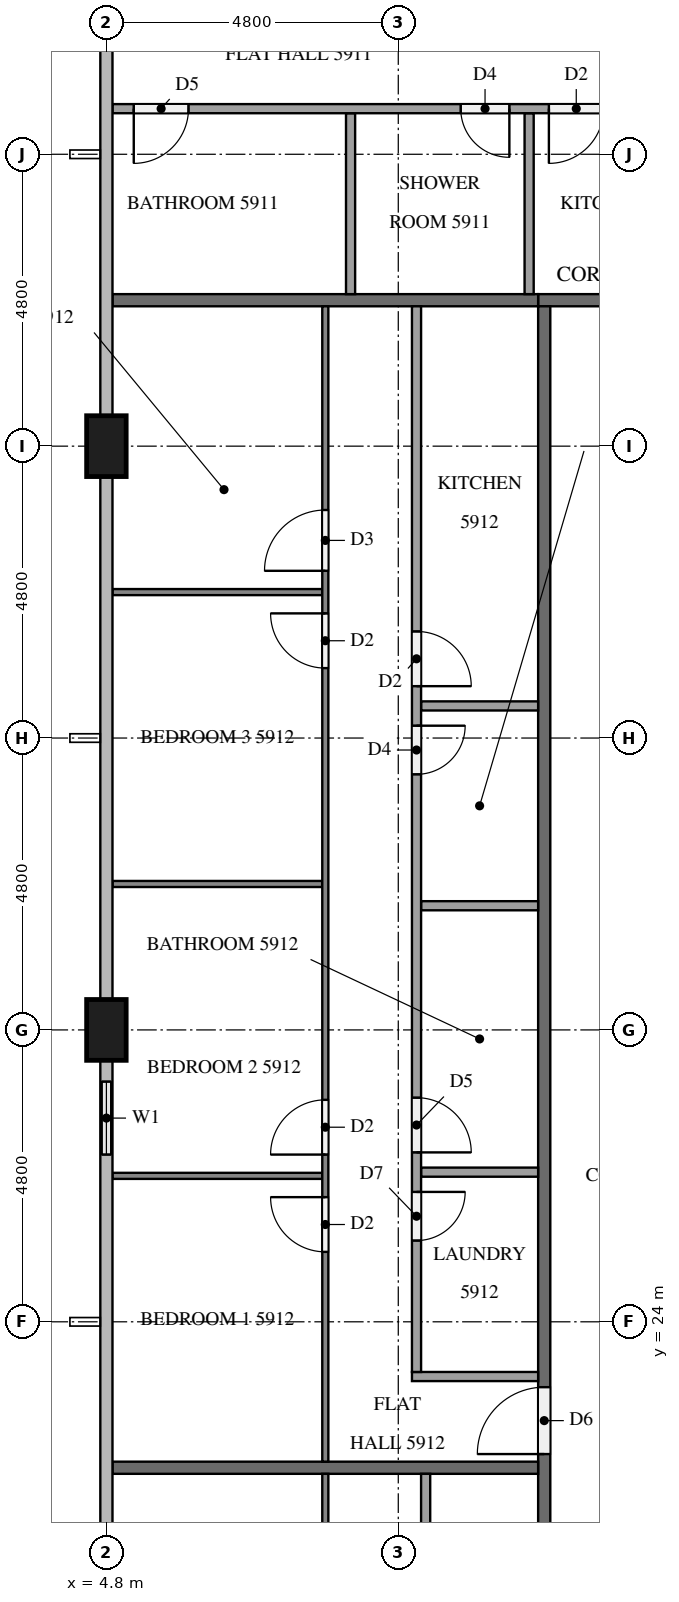
"""IFC4 building model, lengths in metres.
Left out: names, types, materials, properties, quantities, classifications, styles, units other than length and angle.
Written with IfcOpenShell. Run it as: python <this file> out.ifc"""

import sys

from ifc_helpers import new_model, si_unit, direction, frame, frame_2d, origin, origin_2d, place, context, subcontext, project, spatial, rectangle, extrude, element, fill, save


model = new_model("IFC4")
c1 = context("Model", 3, precision=1e-05, world=origin(), true_north=direction((0.0, 1.0)))
c2 = subcontext(c1, "Body", "Model", "MODEL_VIEW")
j1 = project(units=[si_unit("LENGTHUNIT", "METRE"), si_unit("PLANEANGLEUNIT", "RADIAN")], contexts=[c1])
p1 = place(None, origin())
s1 = spatial("IfcSite", under=j1, at=p1, CompositionType="ELEMENT")
p2 = place(p1, origin())
s2 = spatial("IfcBuilding", under=s1, at=p2, CompositionType="ELEMENT")
p3 = place(p2, frame((0.0, 0.0, 226.3)))
s3 = spatial("IfcBuildingStorey", under=s2, at=p3, CompositionType="ELEMENT", Elevation=226.3)
for number, where, z_axis, x_axis in (
    (1, (4.8, 38.4, 0.0), (0.0, 0.0, 1.0), (0.0, 1.0, 0.0)),
    (2, (4.8, 28.8, 0.0), (0.0, 0.0, 1.0), (0.0, 1.0, 0.0)),
):
    element("IfcColumn", number, at=place(p3, frame(where, z_axis=z_axis, x_axis=x_axis)), inside=s3, PredefinedType="COLUMN", context=c2, shape_type="SweptSolid", body=[
        extrude(rectangle(XDim=1.0, YDim=0.65, at=origin_2d()), origin(), (0.0, 0.0, 1.0), 3.2),
    ])
p4 = place(p3, frame((4.8, 28.3, 0.0), z_axis=(0.0, 0.0, 1.0), x_axis=(0.0, -1.0, 0.0)))
e3 = element("IfcWall", 3, at=p4, inside=s3, PredefinedType="SOLIDWALL", context=c2, shape_type="SweptSolid", body=[
    extrude(rectangle(XDim=1.9, YDim=0.15, at=frame_2d((0.95, 0.0))), origin(), (0.0, 0.0, 1.0), 3.2),
])
p5 = place(p4, frame((0.35, 0.0, 0.9)))
e4 = element("IfcOpeningElement", 4, at=p5, cuts=e3, PredefinedType="OPENING", context=c2, shape_type="SweptSolid", body=[
    extrude(rectangle(XDim=1.2, YDim=1.4, at=frame_2d((0.6, 0.7))), frame((0.0, 0.085, 0.0), z_axis=(0.0, -1.0, 0.0), x_axis=(1.0, 0.0, 0.0)), (0.0, 0.0, 1.0), 0.17),
])
p6 = place(p3, frame((11.9, 40.8, 0.0), z_axis=(0.0, 0.0, 1.0), x_axis=(1.0, 0.0, 0.0)))
e5 = element("IfcWall", 5, at=p6, inside=s3, PredefinedType="PARTITIONING", context=c2, shape_type="SweptSolid", body=[
    extrude(rectangle(XDim=38.6, YDim=0.2, at=frame_2d((19.3, 0.0))), origin(), (0.0, 0.0, 1.0), 3.2),
])
p7 = place(p6, frame((33.975, 0.0, 0.0)))
e6 = element("IfcOpeningElement", 6, at=p7, cuts=e5, PredefinedType="OPENING", context=c2, shape_type="SweptSolid", body=[
    extrude(rectangle(XDim=1.0, YDim=2.1, at=frame_2d((0.5, 1.05))), frame((0.0, 0.11, 0.0), z_axis=(0.0, -1.0, 0.0), x_axis=(1.0, 0.0, 0.0)), (0.0, 0.0, 1.0), 0.22),
])
p8 = place(p6, frame((14.725, 0.0, 0.0)))
e7 = element("IfcOpeningElement", 7, at=p8, cuts=e5, PredefinedType="OPENING", context=c2, shape_type="SweptSolid", body=[
    extrude(rectangle(XDim=1.1, YDim=2.1, at=frame_2d((0.55, 1.05))), frame((0.0, 0.11, 0.0), z_axis=(0.0, -1.0, 0.0), x_axis=(1.0, 0.0, 0.0)), (0.0, 0.0, 1.0), 0.22),
])
p9 = place(p6, frame((7.575, 0.0, 0.0)))
e8 = element("IfcOpeningElement", 8, at=p9, cuts=e5, PredefinedType="OPENING", context=c2, shape_type="SweptSolid", body=[
    extrude(rectangle(XDim=1.0, YDim=2.1, at=frame_2d((0.5, 1.05))), frame((0.0, 0.11, 0.0), z_axis=(0.0, -1.0, 0.0), x_axis=(1.0, 0.0, 0.0)), (0.0, 0.0, 1.0), 0.22),
])
p10 = place(p6, frame((6.025, 0.0, 0.0)))
e9 = element("IfcOpeningElement", 9, at=p10, cuts=e5, PredefinedType="OPENING", context=c2, shape_type="SweptSolid", body=[
    extrude(rectangle(XDim=1.0, YDim=2.1, at=frame_2d((0.5, 1.05))), frame((0.0, 0.11, 0.0), z_axis=(0.0, -1.0, 0.0), x_axis=(1.0, 0.0, 0.0)), (0.0, 0.0, 1.0), 0.22),
])
p11 = place(p3, frame((12.0, 12.1, 0.0), z_axis=(0.0, 0.0, 1.0), x_axis=(0.0, 1.0, 0.0)))
e10 = element("IfcWall", 10, at=p11, inside=s3, PredefinedType="PARTITIONING", context=c2, shape_type="SweptSolid", body=[
    extrude(rectangle(XDim=28.6, YDim=0.2, at=frame_2d((14.3, 0.0))), origin(), (0.0, 0.0, 1.0), 3.2),
])
p12 = place(p11, frame((9.725, 0.0, 0.0)))
e11 = element("IfcOpeningElement", 11, at=p12, cuts=e10, PredefinedType="OPENING", context=c2, shape_type="SweptSolid", body=[
    extrude(rectangle(XDim=1.1, YDim=2.1, at=frame_2d((0.55, 1.05))), frame((0.0, 0.11, 0.0), z_axis=(0.0, -1.0, 0.0), x_axis=(1.0, 0.0, 0.0)), (0.0, 0.0, 1.0), 0.22),
])
p13 = place(p11, frame((0.175, 0.0, 0.0)))
e12 = element("IfcOpeningElement", 12, at=p13, cuts=e10, PredefinedType="OPENING", context=c2, shape_type="SweptSolid", body=[
    extrude(rectangle(XDim=1.0, YDim=2.1, at=frame_2d((0.5, 1.05))), frame((0.0, 0.11, 0.0), z_axis=(0.0, -1.0, 0.0), x_axis=(1.0, 0.0, 0.0)), (0.0, 0.0, 1.0), 0.22),
])
for number, where, z_axis, x_axis in (
    (13, (4.9, 40.8, 0.0), (0.0, 0.0, 1.0), (1.0, 0.0, 0.0)),
    (14, (4.9, 21.6, 0.0), (0.0, 0.0, 1.0), (1.0, 0.0, 0.0)),
):
    element("IfcWall", number, at=place(p3, frame(where, z_axis=z_axis, x_axis=x_axis)), inside=s3, PredefinedType="PARTITIONING", context=c2, shape_type="SweptSolid", body=[
        extrude(rectangle(XDim=7.0, YDim=0.2, at=frame_2d((3.5, 0.0))), origin(), (0.0, 0.0, 1.0), 3.2),
    ])
for number, where, z_axis, x_axis in (
    (15, (11.752, 40.9, 0.0), (0.0, 0.0, 1.0), (0.0, 1.0, 0.0)),
    (16, (8.815, 40.9, 0.0), (0.0, 0.0, 1.0), (0.0, 1.0, 0.0)),
):
    element("IfcWall", number, at=place(p3, frame(where, z_axis=z_axis, x_axis=x_axis)), inside=s3, PredefinedType="PARTITIONING", context=c2, shape_type="SweptSolid", body=[
        extrude(rectangle(XDim=2.975, YDim=0.15, at=frame_2d((1.488, 0.0))), origin(), (0.0, 0.0, 1.0), 3.2),
    ])
p14 = place(p3, frame((17.625, 43.95, 0.0), z_axis=(0.0, 0.0, 1.0), x_axis=(-1.0, 0.0, 0.0)))
e17 = element("IfcWall", 17, at=p14, inside=s3, PredefinedType="PARTITIONING", context=c2, shape_type="SweptSolid", body=[
    extrude(rectangle(XDim=12.725, YDim=0.15, at=frame_2d((6.363, 0.0))), origin(), (0.0, 0.0, 1.0), 3.2),
])
p15 = place(p14, frame((4.648, 0.0, 0.0)))
e18 = element("IfcOpeningElement", 18, at=p15, cuts=e17, PredefinedType="OPENING", context=c2, shape_type="SweptSolid", body=[
    extrude(rectangle(XDim=0.9, YDim=2.1, at=frame_2d((0.45, 1.05))), frame((0.0, 0.085, 0.0), z_axis=(0.0, -1.0, 0.0), x_axis=(1.0, 0.0, 0.0)), (0.0, 0.0, 1.0), 0.17),
])
p16 = place(p14, frame((6.198, 0.0, 0.0)))
e19 = element("IfcOpeningElement", 19, at=p16, cuts=e17, PredefinedType="OPENING", context=c2, shape_type="SweptSolid", body=[
    extrude(rectangle(XDim=0.8, YDim=2.1, at=frame_2d((0.4, 1.05))), frame((0.0, 0.085, 0.0), z_axis=(0.0, -1.0, 0.0), x_axis=(1.0, 0.0, 0.0)), (0.0, 0.0, 1.0), 0.17),
])
p17 = place(p14, frame((11.475, 0.0, 0.0)))
e20 = element("IfcOpeningElement", 20, at=p17, cuts=e17, PredefinedType="OPENING", context=c2, shape_type="SweptSolid", body=[
    extrude(rectangle(XDim=0.9, YDim=2.1, at=frame_2d((0.45, 1.05))), frame((0.0, 0.085, 0.0), z_axis=(0.0, -1.0, 0.0), x_axis=(1.0, 0.0, 0.0)), (0.0, 0.0, 1.0), 0.17),
])
for number, where, z_axis, x_axis in (
    (21, (8.35, 26.4, 0.0), (0.0, 0.0, 1.0), (-1.0, 0.0, 0.0)),
    (22, (8.35, 31.2, 0.0), (0.0, 0.0, 1.0), (-1.0, 0.0, 0.0)),
    (23, (8.35, 36.0, 0.0), (0.0, 0.0, 1.0), (-1.0, 0.0, 0.0)),
):
    element("IfcWall", number, at=place(p3, frame(where, z_axis=z_axis, x_axis=x_axis)), inside=s3, PredefinedType="PARTITIONING", context=c2, shape_type="SweptSolid", body=[
        extrude(rectangle(XDim=3.45, YDim=0.1, at=frame_2d((1.725, 0.0))), origin(), (0.0, 0.0, 1.0), 3.2),
    ])
p18 = place(p3, frame((8.4, 21.7, 0.0), z_axis=(0.0, 0.0, 1.0), x_axis=(0.0, 1.0, 0.0)))
e24 = element("IfcWall", 24, at=p18, inside=s3, PredefinedType="PARTITIONING", context=c2, shape_type="SweptSolid", body=[
    extrude(rectangle(XDim=19.0, YDim=0.1, at=frame_2d((9.5, 0.0))), origin(), (0.0, 0.0, 1.0), 3.2),
])
p19 = place(p18, frame((3.45, 0.0, 0.0)))
e25 = element("IfcOpeningElement", 25, at=p19, cuts=e24, PredefinedType="OPENING", context=c2, shape_type="SweptSolid", body=[
    extrude(rectangle(XDim=0.9, YDim=2.1, at=frame_2d((0.45, 1.05))), frame((0.0, 0.06, 0.0), z_axis=(0.0, -1.0, 0.0), x_axis=(1.0, 0.0, 0.0)), (0.0, 0.0, 1.0), 0.12),
])
p20 = place(p18, frame((5.05, 0.0, 0.0)))
e26 = element("IfcOpeningElement", 26, at=p20, cuts=e24, PredefinedType="OPENING", context=c2, shape_type="SweptSolid", body=[
    extrude(rectangle(XDim=0.9, YDim=2.1, at=frame_2d((0.45, 1.05))), frame((0.0, 0.06, 0.0), z_axis=(0.0, -1.0, 0.0), x_axis=(1.0, 0.0, 0.0)), (0.0, 0.0, 1.0), 0.12),
])
p21 = place(p18, frame((13.05, 0.0, 0.0)))
e27 = element("IfcOpeningElement", 27, at=p21, cuts=e24, PredefinedType="OPENING", context=c2, shape_type="SweptSolid", body=[
    extrude(rectangle(XDim=0.9, YDim=2.1, at=frame_2d((0.45, 1.05))), frame((0.0, 0.06, 0.0), z_axis=(0.0, -1.0, 0.0), x_axis=(1.0, 0.0, 0.0)), (0.0, 0.0, 1.0), 0.12),
])
p22 = place(p18, frame((14.65, 0.0, 0.0)))
e28 = element("IfcOpeningElement", 28, at=p22, cuts=e24, PredefinedType="OPENING", context=c2, shape_type="SweptSolid", body=[
    extrude(rectangle(XDim=1.0, YDim=2.1, at=frame_2d((0.5, 1.05))), frame((0.0, 0.06, 0.0), z_axis=(0.0, -1.0, 0.0), x_axis=(1.0, 0.0, 0.0)), (0.0, 0.0, 1.0), 0.12),
])
for number, where, z_axis, x_axis in (
    (29, (11.9, 26.461, 0.0), (0.0, 0.0, 1.0), (-1.0, 0.0, 0.0)),
    (30, (11.9, 30.842, 0.0), (0.0, 0.0, 1.0), (-1.0, 0.0, 0.0)),
    (31, (11.9, 34.128, 0.0), (0.0, 0.0, 1.0), (-1.0, 0.0, 0.0)),
):
    element("IfcWall", number, at=place(p3, frame(where, z_axis=z_axis, x_axis=x_axis)), inside=s3, PredefinedType="PARTITIONING", context=c2, shape_type="SweptSolid", body=[
        extrude(rectangle(XDim=1.925, YDim=0.15, at=frame_2d((0.962, 0.0))), origin(), (0.0, 0.0, 1.0), 3.2),
    ])
p23 = place(p3, frame((11.9, 23.1, 0.0), z_axis=(0.0, 0.0, 1.0), x_axis=(-1.0, 0.0, 0.0)))
e32 = element("IfcWall", 32, at=p23, inside=s3, PredefinedType="PARTITIONING", context=c2, shape_type="SweptSolid", body=[
    extrude(rectangle(XDim=2.075, YDim=0.15, at=frame_2d((1.038, 0.0))), origin(), (0.0, 0.0, 1.0), 3.2),
])
p24 = place(p3, frame((9.9, 40.7, 0.0), z_axis=(0.0, 0.0, 1.0), x_axis=(0.0, -1.0, 0.0)))
e33 = element("IfcWall", 33, at=p24, inside=s3, PredefinedType="PARTITIONING", context=c2, shape_type="SweptSolid", body=[
    extrude(rectangle(XDim=17.525, YDim=0.15, at=frame_2d((8.762, 0.0))), origin(), (0.0, 0.0, 1.0), 3.2),
])
p25 = place(p24, frame((14.564, 0.0, 0.0)))
e34 = element("IfcOpeningElement", 34, at=p25, cuts=e33, PredefinedType="OPENING", context=c2, shape_type="SweptSolid", body=[
    extrude(rectangle(XDim=0.8, YDim=2.1, at=frame_2d((0.4, 1.05))), frame((0.0, 0.085, 0.0), z_axis=(0.0, -1.0, 0.0), x_axis=(1.0, 0.0, 0.0)), (0.0, 0.0, 1.0), 0.17),
])
p26 = place(p24, frame((13.014, 0.0, 0.0)))
e35 = element("IfcOpeningElement", 35, at=p26, cuts=e33, PredefinedType="OPENING", context=c2, shape_type="SweptSolid", body=[
    extrude(rectangle(XDim=0.9, YDim=2.1, at=frame_2d((0.45, 1.05))), frame((0.0, 0.085, 0.0), z_axis=(0.0, -1.0, 0.0), x_axis=(1.0, 0.0, 0.0)), (0.0, 0.0, 1.0), 0.17),
])
p27 = place(p24, frame((6.897, 0.0, 0.0)))
e36 = element("IfcOpeningElement", 36, at=p27, cuts=e33, PredefinedType="OPENING", context=c2, shape_type="SweptSolid", body=[
    extrude(rectangle(XDim=0.8, YDim=2.1, at=frame_2d((0.4, 1.05))), frame((0.0, 0.085, 0.0), z_axis=(0.0, -1.0, 0.0), x_axis=(1.0, 0.0, 0.0)), (0.0, 0.0, 1.0), 0.17),
])
p28 = place(p24, frame((5.347, 0.0, 0.0)))
e37 = element("IfcOpeningElement", 37, at=p28, cuts=e33, PredefinedType="OPENING", context=c2, shape_type="SweptSolid", body=[
    extrude(rectangle(XDim=0.9, YDim=2.1, at=frame_2d((0.45, 1.05))), frame((0.0, 0.085, 0.0), z_axis=(0.0, -1.0, 0.0), x_axis=(1.0, 0.0, 0.0)), (0.0, 0.0, 1.0), 0.17),
])
p29 = place(p3, frame((8.4, 12.1, 0.0), z_axis=(0.0, 0.0, 1.0), x_axis=(0.0, 1.0, 0.0)))
e38 = element("IfcWall", 38, at=p29, inside=s3, PredefinedType="PARTITIONING", context=c2, shape_type="SweptSolid", body=[
    extrude(rectangle(XDim=9.4, YDim=0.1, at=frame_2d((4.7, 0.0))), origin(), (0.0, 0.0, 1.0), 3.2),
])
p30 = place(p29, frame((3.35, 0.0, 0.0)))
e39 = element("IfcOpeningElement", 39, at=p30, cuts=e38, PredefinedType="OPENING", context=c2, shape_type="SweptSolid", body=[
    extrude(rectangle(XDim=1.0, YDim=2.1, at=frame_2d((0.5, 1.05))), frame((0.0, 0.06, 0.0), z_axis=(0.0, -1.0, 0.0), x_axis=(1.0, 0.0, 0.0)), (0.0, 0.0, 1.0), 0.12),
])
p31 = place(p29, frame((5.05, 0.0, 0.0)))
e40 = element("IfcOpeningElement", 40, at=p31, cuts=e38, PredefinedType="OPENING", context=c2, shape_type="SweptSolid", body=[
    extrude(rectangle(XDim=0.9, YDim=2.1, at=frame_2d((0.45, 1.05))), frame((0.0, 0.06, 0.0), z_axis=(0.0, -1.0, 0.0), x_axis=(1.0, 0.0, 0.0)), (0.0, 0.0, 1.0), 0.12),
])
p32 = place(p3, frame((10.05, 21.5, 0.0), z_axis=(0.0, 0.0, 1.0), x_axis=(0.0, -1.0, 0.0)))
e41 = element("IfcWall", 41, at=p32, inside=s3, PredefinedType="PARTITIONING", context=c2, shape_type="SweptSolid", body=[
    extrude(rectangle(XDim=7.925, YDim=0.15, at=frame_2d((3.962, 0.0))), origin(), (0.0, 0.0, 1.0), 3.2),
])
p33 = place(p32, frame((5.08, 0.0, 0.0)))
e42 = element("IfcOpeningElement", 42, at=p33, cuts=e41, PredefinedType="OPENING", context=c2, shape_type="SweptSolid", body=[
    extrude(rectangle(XDim=0.8, YDim=2.1, at=frame_2d((0.4, 1.05))), frame((0.0, 0.085, 0.0), z_axis=(0.0, -1.0, 0.0), x_axis=(1.0, 0.0, 0.0)), (0.0, 0.0, 1.0), 0.17),
])
p34 = place(p32, frame((3.53, 0.0, 0.0)))
e43 = element("IfcOpeningElement", 43, at=p34, cuts=e41, PredefinedType="OPENING", context=c2, shape_type="SweptSolid", body=[
    extrude(rectangle(XDim=0.9, YDim=2.1, at=frame_2d((0.45, 1.05))), frame((0.0, 0.085, 0.0), z_axis=(0.0, -1.0, 0.0), x_axis=(1.0, 0.0, 0.0)), (0.0, 0.0, 1.0), 0.17),
])
p35 = place(p5, origin())
e44 = element("IfcWindow", 44, at=p35, inside=s3, PartitioningType="SINGLE_PANEL", PredefinedType="WINDOW", context=c2, shape_type="SweptSolid", body=[
    extrude(rectangle(XDim=1.2, YDim=1.4, at=frame_2d((0.6, 0.7))), frame((0.0, 0.03, 0.0), z_axis=(0.0, -1.0, 0.0), x_axis=(1.0, 0.0, 0.0)), (0.0, 0.0, 1.0), 0.06),
])
fill(e4, e44)
p36 = place(p12, origin())
e45 = element("IfcDoor", 45, at=p36, inside=s3, OperationType="SINGLE_SWING_LEFT", PredefinedType="DOOR", context=c2, shape_type="SweptSolid", body=[
    extrude(rectangle(XDim=1.1, YDim=2.1, at=frame_2d((0.55, 1.05))), frame((0.0, 0.025, 0.0), z_axis=(0.0, -1.0, 0.0), x_axis=(1.0, 0.0, 0.0)), (0.0, 0.0, 1.0), 0.05),
])
fill(e11, e45)
p37 = place(p15, origin())
e46 = element("IfcDoor", 46, at=p37, inside=s3, OperationType="SINGLE_SWING_RIGHT", PredefinedType="DOOR", context=c2, shape_type="SweptSolid", body=[
    extrude(rectangle(XDim=0.9, YDim=2.1, at=frame_2d((0.45, 1.05))), frame((0.0, 0.025, 0.0), z_axis=(0.0, -1.0, 0.0), x_axis=(1.0, 0.0, 0.0)), (0.0, 0.0, 1.0), 0.05),
])
fill(e18, e46)
p38 = place(p16, origin())
e47 = element("IfcDoor", 47, at=p38, inside=s3, OperationType="SINGLE_SWING_LEFT", PredefinedType="DOOR", context=c2, shape_type="SweptSolid", body=[
    extrude(rectangle(XDim=0.8, YDim=2.1, at=frame_2d((0.4, 1.05))), frame((0.0, 0.025, 0.0), z_axis=(0.0, -1.0, 0.0), x_axis=(1.0, 0.0, 0.0)), (0.0, 0.0, 1.0), 0.05),
])
fill(e19, e47)
p39 = place(p17, origin())
e48 = element("IfcDoor", 48, at=p39, inside=s3, OperationType="SINGLE_SWING_RIGHT", PredefinedType="DOOR", context=c2, shape_type="SweptSolid", body=[
    extrude(rectangle(XDim=0.9, YDim=2.1, at=frame_2d((0.45, 1.05))), frame((0.0, 0.025, 0.0), z_axis=(0.0, -1.0, 0.0), x_axis=(1.0, 0.0, 0.0)), (0.0, 0.0, 1.0), 0.05),
])
fill(e20, e48)
p40 = place(p19, origin())
e49 = element("IfcDoor", 49, at=p40, inside=s3, OperationType="SINGLE_SWING_RIGHT", PredefinedType="DOOR", context=c2, shape_type="SweptSolid", body=[
    extrude(rectangle(XDim=0.9, YDim=2.1, at=frame_2d((0.45, 1.05))), frame((0.0, 0.025, 0.0), z_axis=(0.0, -1.0, 0.0), x_axis=(1.0, 0.0, 0.0)), (0.0, 0.0, 1.0), 0.05),
])
fill(e25, e49)
p41 = place(p20, origin())
e50 = element("IfcDoor", 50, at=p41, inside=s3, OperationType="SINGLE_SWING_LEFT", PredefinedType="DOOR", context=c2, shape_type="SweptSolid", body=[
    extrude(rectangle(XDim=0.9, YDim=2.1, at=frame_2d((0.45, 1.05))), frame((0.0, 0.025, 0.0), z_axis=(0.0, -1.0, 0.0), x_axis=(1.0, 0.0, 0.0)), (0.0, 0.0, 1.0), 0.05),
])
fill(e26, e50)
p42 = place(p21, origin())
e51 = element("IfcDoor", 51, at=p42, inside=s3, OperationType="SINGLE_SWING_RIGHT", PredefinedType="DOOR", context=c2, shape_type="SweptSolid", body=[
    extrude(rectangle(XDim=0.9, YDim=2.1, at=frame_2d((0.45, 1.05))), frame((0.0, 0.025, 0.0), z_axis=(0.0, -1.0, 0.0), x_axis=(1.0, 0.0, 0.0)), (0.0, 0.0, 1.0), 0.05),
])
fill(e27, e51)
p43 = place(p22, origin())
e52 = element("IfcDoor", 52, at=p43, inside=s3, OperationType="SINGLE_SWING_LEFT", PredefinedType="DOOR", context=c2, shape_type="SweptSolid", body=[
    extrude(rectangle(XDim=1.0, YDim=2.1, at=frame_2d((0.5, 1.05))), frame((0.0, 0.025, 0.0), z_axis=(0.0, -1.0, 0.0), x_axis=(1.0, 0.0, 0.0)), (0.0, 0.0, 1.0), 0.05),
])
fill(e28, e52)
p44 = place(p25, origin())
e53 = element("IfcDoor", 53, at=p44, inside=s3, OperationType="SINGLE_SWING_LEFT", PredefinedType="DOOR", context=c2, shape_type="SweptSolid", body=[
    extrude(rectangle(XDim=0.8, YDim=2.1, at=frame_2d((0.4, 1.05))), frame((0.0, 0.025, 0.0), z_axis=(0.0, -1.0, 0.0), x_axis=(1.0, 0.0, 0.0)), (0.0, 0.0, 1.0), 0.05),
])
fill(e34, e53)
p45 = place(p26, origin())
e54 = element("IfcDoor", 54, at=p45, inside=s3, OperationType="SINGLE_SWING_RIGHT", PredefinedType="DOOR", context=c2, shape_type="SweptSolid", body=[
    extrude(rectangle(XDim=0.9, YDim=2.1, at=frame_2d((0.45, 1.05))), frame((0.0, 0.025, 0.0), z_axis=(0.0, -1.0, 0.0), x_axis=(1.0, 0.0, 0.0)), (0.0, 0.0, 1.0), 0.05),
])
fill(e35, e54)
p46 = place(p27, origin())
e55 = element("IfcDoor", 55, at=p46, inside=s3, OperationType="SINGLE_SWING_LEFT", PredefinedType="DOOR", context=c2, shape_type="SweptSolid", body=[
    extrude(rectangle(XDim=0.8, YDim=2.1, at=frame_2d((0.4, 1.05))), frame((0.0, 0.025, 0.0), z_axis=(0.0, -1.0, 0.0), x_axis=(1.0, 0.0, 0.0)), (0.0, 0.0, 1.0), 0.05),
])
fill(e36, e55)
p47 = place(p28, origin())
e56 = element("IfcDoor", 56, at=p47, inside=s3, OperationType="SINGLE_SWING_RIGHT", PredefinedType="DOOR", context=c2, shape_type="SweptSolid", body=[
    extrude(rectangle(XDim=0.9, YDim=2.1, at=frame_2d((0.45, 1.05))), frame((0.0, 0.025, 0.0), z_axis=(0.0, -1.0, 0.0), x_axis=(1.0, 0.0, 0.0)), (0.0, 0.0, 1.0), 0.05),
])
fill(e37, e56)
save(model, sys.argv[1])
